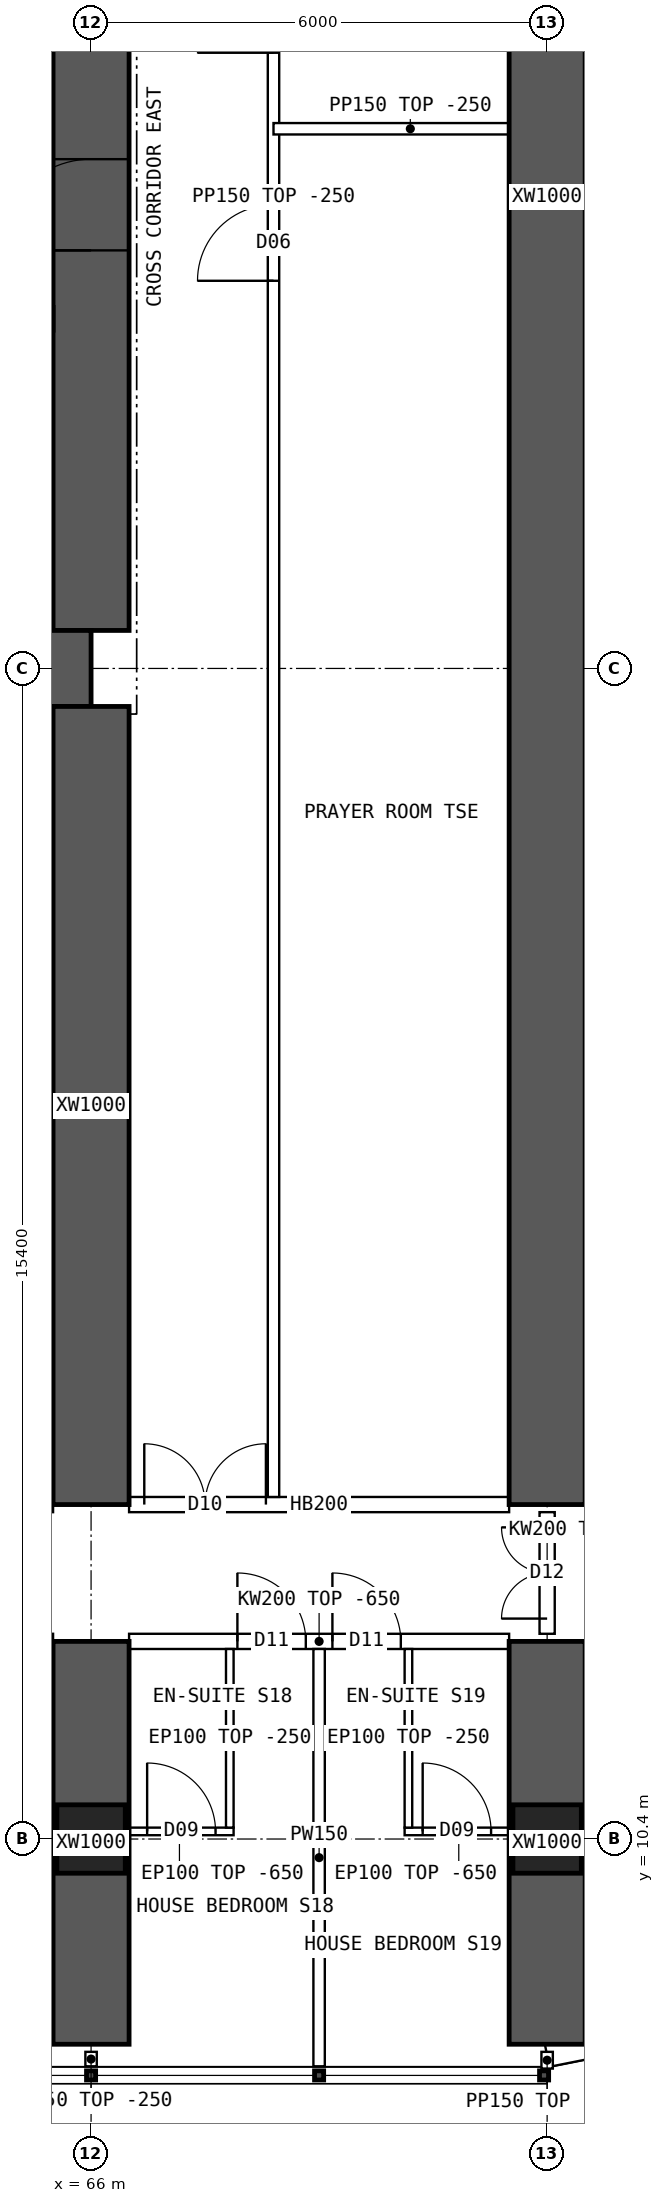
"""IFC4 building model, lengths in metres.
Left out: names, types, materials, properties, quantities, classifications, styles, units other than length and angle.
Written with IfcOpenShell. Run it as: python <this file> out.ifc"""

import sys

from ifc_helpers import new_model, si_unit, direction, frame, frame_2d, origin, origin_2d, place, context, subcontext, project, spatial, polyline, rectangle, hollow_rectangle, outline, extrude, element, fill, save


model = new_model("IFC4")
c1 = context("Model", 3, precision=1e-05, world=origin(), true_north=direction((0.0, 1.0)))
c2 = subcontext(c1, "Body", "Model", "MODEL_VIEW")
j1 = project(units=[si_unit("LENGTHUNIT", "METRE"), si_unit("PLANEANGLEUNIT", "RADIAN")], contexts=[c1])
p1 = place(None, origin())
s1 = spatial("IfcSite", under=j1, at=p1, CompositionType="ELEMENT")
p2 = place(p1, origin())
s2 = spatial("IfcBuilding", under=s1, at=p2, CompositionType="ELEMENT")
p3 = place(p2, frame((0.0, 0.0, 27.7)))
s3 = spatial("IfcBuildingStorey", under=s2, at=p3, CompositionType="ELEMENT", Elevation=27.7)
for number, where, z_axis, x_axis in (
    (1, (66.0, 10.4, 0.0), (0.0, 0.0, 1.0), (1.0, 0.0, 0.0)),
    (2, (72.0, 10.4, 0.0), (0.0, 0.0, 1.0), (1.0, 0.0, 0.0)),
):
    element("IfcColumn", number, at=place(p3, frame(where, z_axis=z_axis, x_axis=x_axis)), inside=s3, PredefinedType="COLUMN", context=c2, shape_type="SweptSolid", body=[
        extrude(hollow_rectangle(XDim=0.9, YDim=0.9, WallThickness=0.09, at=origin_2d()), origin(), (0.0, 0.0, 1.0), 3.75),
    ])
p4 = place(p3, frame((18.0, 25.8, 0.0), z_axis=(0.0, 0.0, 1.0), x_axis=(1.0, 0.0, 0.0)))
e3 = element("IfcWall", 3, at=p4, inside=s3, PredefinedType="SHEAR", context=c2, shape_type="SweptSolid", body=[
    extrude(rectangle(XDim=48.0, YDim=1.0, at=frame_2d((24.0, 0.0))), origin(), (0.0, 0.0, 1.0), 3.75),
])
p5 = place(p3, frame((66.0, 26.3, 0.0), z_axis=(0.0, 0.0, 1.0), x_axis=(0.0, 1.0, 0.0)))
e4 = element("IfcWall", 4, at=p5, inside=s3, PredefinedType="SHEAR", context=c2, shape_type="SweptSolid", body=[
    extrude(rectangle(XDim=11.4, YDim=1.0, at=frame_2d((5.7, 0.0))), origin(), (0.0, 0.0, 1.0), 3.75),
])
p6 = place(p5, frame((5.0, 0.0, 0.0)))
e5 = element("IfcOpeningElement", 5, at=p6, cuts=e4, PredefinedType="OPENING", context=c2, shape_type="SweptSolid", body=[
    extrude(rectangle(XDim=1.2, YDim=2.1, at=frame_2d((0.6, 1.05))), frame((0.0, 0.51, 0.0), z_axis=(0.0, -1.0, 0.0), x_axis=(1.0, 0.0, 0.0)), (0.0, 0.0, 1.0), 1.02),
])
p7 = place(p3, frame((66.0, 7.7, 0.0), z_axis=(0.0, 0.0, 1.0), x_axis=(0.0, 1.0, 0.0)))
e6 = element("IfcWall", 6, at=p7, inside=s3, PredefinedType="SHEAR", context=c2, shape_type="SweptSolid", body=[
    extrude(rectangle(XDim=5.3, YDim=1.0, at=frame_2d((2.65, 0.0))), origin(), (0.0, 0.0, 1.0), 3.75),
])
p8 = place(p3, frame((66.0, 14.8, 0.0), z_axis=(0.0, 0.0, 1.0), x_axis=(0.0, 1.0, 0.0)))
e7 = element("IfcWall", 7, at=p8, inside=s3, PredefinedType="SHEAR", context=c2, shape_type="SweptSolid", body=[
    extrude(rectangle(XDim=10.5, YDim=1.0, at=frame_2d((5.25, 0.0))), origin(), (0.0, 0.0, 1.0), 3.75),
])
p9 = place(p3, frame((72.0, 7.7, 0.0), z_axis=(0.0, 0.0, 1.0), x_axis=(0.0, 1.0, 0.0)))
e8 = element("IfcWall", 8, at=p9, inside=s3, PredefinedType="SHEAR", context=c2, shape_type="SweptSolid", body=[
    extrude(rectangle(XDim=5.3, YDim=1.0, at=frame_2d((2.65, 0.0))), origin(), (0.0, 0.0, 1.0), 3.75),
])
p10 = place(p3, frame((72.0, 14.8, 0.0), z_axis=(0.0, 0.0, 1.0), x_axis=(0.0, 1.0, 0.0)))
e9 = element("IfcWall", 9, at=p10, inside=s3, PredefinedType="SHEAR", context=c2, shape_type="SweptSolid", body=[
    extrude(rectangle(XDim=34.4, YDim=1.0, at=frame_2d((17.2, 0.0))), origin(), (0.0, 0.0, 1.0), 3.75),
])
p11 = place(p3, frame((72.0, 7.55, 0.0), z_axis=(0.0, 0.0, 1.0), x_axis=(0.980787251524, 0.195080412259, 0.0)))
e10 = element("IfcWall", 10, at=p11, inside=s3, PredefinedType="SOLIDWALL", context=c2, shape_type="SweptSolid", body=[
    extrude(outline(polyline([(-0.03, -0.15), (3.249, -0.15), (3.189, 0.15), (0.03, 0.15), (-0.03, -0.15)])), origin(), (0.0, 0.0, 1.0), 3.5),
])
p12 = place(p11, frame((0.909, 0.0, 0.9)))
e11 = element("IfcOpeningElement", 11, at=p12, cuts=e10, PredefinedType="OPENING", context=c2, shape_type="SweptSolid", body=[
    extrude(rectangle(XDim=1.4, YDim=1.8, at=frame_2d((0.7, 0.9))), frame((0.0, 0.16, 0.0), z_axis=(0.0, -1.0, 0.0), x_axis=(1.0, 0.0, 0.0)), (0.0, 0.0, 1.0), 0.32),
])
p13 = place(p3, frame((66.5, 13.0, 0.0), z_axis=(0.0, 0.0, 1.0), x_axis=(1.0, 0.0, 0.0)))
e12 = element("IfcWall", 12, at=p13, inside=s3, PredefinedType="SOLIDWALL", context=c2, shape_type="SweptSolid", body=[
    extrude(outline(polyline([(0.0, 0.0), (5.0, 0.0), (5.0, 3.1), (0.0, 3.1), (0.0, 0.0)])), frame((0.0, 0.1, 0.0), z_axis=(0.0, -1.0, 0.0), x_axis=(1.0, 0.0, 0.0)), (0.0, 0.0, 1.0), 0.2),
])
p14 = place(p13, frame((1.425, 0.0, 0.0)))
e13 = element("IfcOpeningElement", 13, at=p14, cuts=e12, PredefinedType="OPENING", context=c2, shape_type="SweptSolid", body=[
    extrude(rectangle(XDim=0.9, YDim=2.1, at=frame_2d((0.45, 1.05))), frame((0.0, 0.11, 0.0), z_axis=(0.0, -1.0, 0.0), x_axis=(1.0, 0.0, 0.0)), (0.0, 0.0, 1.0), 0.22),
])
p15 = place(p13, frame((2.675, 0.0, 0.0)))
e14 = element("IfcOpeningElement", 14, at=p15, cuts=e12, PredefinedType="OPENING", context=c2, shape_type="SweptSolid", body=[
    extrude(rectangle(XDim=0.9, YDim=2.1, at=frame_2d((0.45, 1.05))), frame((0.0, 0.11, 0.0), z_axis=(0.0, -1.0, 0.0), x_axis=(1.0, 0.0, 0.0)), (0.0, 0.0, 1.0), 0.22),
])
p16 = place(p3, frame((66.5, 14.8, 0.0), z_axis=(0.0, 0.0, 1.0), x_axis=(1.0, 0.0, 0.0)))
e15 = element("IfcWall", 15, at=p16, inside=s3, PredefinedType="SOLIDWALL", context=c2, shape_type="SweptSolid", body=[
    extrude(rectangle(XDim=5.0, YDim=0.2, at=frame_2d((2.5, 0.0))), origin(), (0.0, 0.0, 1.0), 3.5),
])
p17 = place(p16, frame((0.2, 0.0, 0.0)))
e16 = element("IfcOpeningElement", 16, at=p17, cuts=e15, PredefinedType="OPENING", context=c2, shape_type="SweptSolid", body=[
    extrude(rectangle(XDim=1.6, YDim=2.1, at=frame_2d((0.8, 1.05))), frame((0.0, 0.11, 0.0), z_axis=(0.0, -1.0, 0.0), x_axis=(1.0, 0.0, 0.0)), (0.0, 0.0, 1.0), 0.22),
])
p18 = place(p3, frame((65.55, 10.5, 0.0), z_axis=(0.0, 0.0, 1.0), x_axis=(-1.0, 0.0, 0.0)))
e17 = element("IfcWall", 17, at=p18, inside=s3, PredefinedType="PARTITIONING", context=c2, shape_type="SweptSolid", body=[
    extrude(outline(polyline([(0.0, 0.0), (1.425, 0.0), (1.425, 3.1), (0.0, 3.1), (0.0, 0.0)])), frame((0.0, 0.05, 0.0), z_axis=(0.0, -1.0, 0.0), x_axis=(1.0, 0.0, 0.0)), (0.0, 0.0, 1.0), 0.1),
])
p19 = place(p18, frame((0.288, 0.0, 0.0)))
e18 = element("IfcOpeningElement", 18, at=p19, cuts=e17, PredefinedType="OPENING", context=c2, shape_type="SweptSolid", body=[
    extrude(rectangle(XDim=0.9, YDim=2.1, at=frame_2d((0.45, 1.05))), frame((0.0, 0.06, 0.0), z_axis=(0.0, -1.0, 0.0), x_axis=(1.0, 0.0, 0.0)), (0.0, 0.0, 1.0), 0.12),
])
p20 = place(p3, frame((69.0, 7.41, 0.0), z_axis=(0.0, 0.0, 1.0), x_axis=(0.0, 1.0, 0.0)))
e19 = element("IfcWall", 19, at=p20, inside=s3, PredefinedType="PARTITIONING", context=c2, shape_type="SweptSolid", body=[
    extrude(outline(polyline([(0.0, 0.0), (5.49, 0.0), (5.49, 3.1), (5.442, 3.1), (5.44, 3.5), (3.192, 3.5), (3.19, 3.1), (2.792, 3.1), (2.79, 3.5), (0.0, 3.5), (0.0, 0.0)])), frame((0.0, 0.075, 0.0), z_axis=(0.0, -1.0, 0.0), x_axis=(1.0, 0.0, 0.0)), (0.0, 0.0, 1.0), 0.15),
])
p21 = place(p3, frame((67.875, 10.5, 0.0), z_axis=(0.0, 0.0, 1.0), x_axis=(-1.0, 0.0, 0.0)))
e20 = element("IfcWall", 20, at=p21, inside=s3, PredefinedType="PARTITIONING", context=c2, shape_type="SweptSolid", body=[
    extrude(outline(polyline([(0.0, 0.0), (1.425, 0.0), (1.425, 3.1), (0.0, 3.1), (0.0, 0.0)])), frame((0.0, 0.05, 0.0), z_axis=(0.0, -1.0, 0.0), x_axis=(1.0, 0.0, 0.0)), (0.0, 0.0, 1.0), 0.1),
])
p22 = place(p21, frame((0.238, 0.0, 0.0)))
e21 = element("IfcOpeningElement", 21, at=p22, cuts=e20, PredefinedType="OPENING", context=c2, shape_type="SweptSolid", body=[
    extrude(rectangle(XDim=0.9, YDim=2.1, at=frame_2d((0.45, 1.05))), frame((0.0, 0.06, 0.0), z_axis=(0.0, -1.0, 0.0), x_axis=(1.0, 0.0, 0.0)), (0.0, 0.0, 1.0), 0.12),
])
p23 = place(p3, frame((67.825, 10.55, 0.0), z_axis=(0.0, 0.0, 1.0), x_axis=(0.0, 1.0, 0.0)))
e22 = element("IfcWall", 22, at=p23, inside=s3, PredefinedType="PARTITIONING", context=c2, shape_type="SweptSolid", body=[
    extrude(outline(polyline([(0.0, 0.0), (2.35, 0.0), (2.35, 3.1), (2.302, 3.1), (2.3, 3.5), (0.052, 3.5), (0.05, 3.1), (0.0, 3.1), (0.0, 0.0)])), frame((0.0, 0.05, 0.0), z_axis=(0.0, -1.0, 0.0), x_axis=(1.0, 0.0, 0.0)), (0.0, 0.0, 1.0), 0.1),
])
p24 = place(p3, frame((71.55, 10.5, 0.0), z_axis=(0.0, 0.0, 1.0), x_axis=(-1.0, 0.0, 0.0)))
e23 = element("IfcWall", 23, at=p24, inside=s3, PredefinedType="PARTITIONING", context=c2, shape_type="SweptSolid", body=[
    extrude(outline(polyline([(0.0, 0.0), (1.425, 0.0), (1.425, 3.1), (0.0, 3.1), (0.0, 0.0)])), frame((0.0, 0.05, 0.0), z_axis=(0.0, -1.0, 0.0), x_axis=(1.0, 0.0, 0.0)), (0.0, 0.0, 1.0), 0.1),
])
p25 = place(p24, frame((0.288, 0.0, 0.0)))
e24 = element("IfcOpeningElement", 24, at=p25, cuts=e23, PredefinedType="OPENING", context=c2, shape_type="SweptSolid", body=[
    extrude(rectangle(XDim=0.9, YDim=2.1, at=frame_2d((0.45, 1.05))), frame((0.0, 0.06, 0.0), z_axis=(0.0, -1.0, 0.0), x_axis=(1.0, 0.0, 0.0)), (0.0, 0.0, 1.0), 0.12),
])
p26 = place(p3, frame((70.175, 10.55, 0.0), z_axis=(0.0, 0.0, 1.0), x_axis=(0.0, 1.0, 0.0)))
e25 = element("IfcWall", 25, at=p26, inside=s3, PredefinedType="PARTITIONING", context=c2, shape_type="SweptSolid", body=[
    extrude(outline(polyline([(0.0, 0.0), (2.35, 0.0), (2.35, 3.1), (2.302, 3.1), (2.3, 3.5), (0.052, 3.5), (0.05, 3.1), (0.0, 3.1), (0.0, 0.0)])), frame((0.0, 0.05, 0.0), z_axis=(0.0, -1.0, 0.0), x_axis=(1.0, 0.0, 0.0)), (0.0, 0.0, 1.0), 0.1),
])
p27 = place(p3, frame((68.4, 14.9, 0.0), z_axis=(0.0, 0.0, 1.0), x_axis=(0.0, 1.0, 0.0)))
e26 = element("IfcWall", 26, at=p27, inside=s3, PredefinedType="PARTITIONING", context=c2, shape_type="SweptSolid", body=[
    extrude(rectangle(XDim=34.2, YDim=0.15, at=frame_2d((17.1, 0.0))), origin(), (0.0, 0.0, 1.0), 3.5),
])
p28 = place(p27, frame((16.0, 0.0, 0.0)))
e27 = element("IfcOpeningElement", 27, at=p28, cuts=e26, PredefinedType="OPENING", context=c2, shape_type="SweptSolid", body=[
    extrude(rectangle(XDim=1.0, YDim=2.1, at=frame_2d((0.5, 1.05))), frame((0.0, 0.085, 0.0), z_axis=(0.0, -1.0, 0.0), x_axis=(1.0, 0.0, 0.0)), (0.0, 0.0, 1.0), 0.17),
])
p29 = place(p27, frame((19.0, 0.0, 0.0)))
e28 = element("IfcOpeningElement", 28, at=p29, cuts=e26, PredefinedType="OPENING", context=c2, shape_type="SweptSolid", body=[
    extrude(rectangle(XDim=1.0, YDim=2.1, at=frame_2d((0.5, 1.05))), frame((0.0, 0.085, 0.0), z_axis=(0.0, -1.0, 0.0), x_axis=(1.0, 0.0, 0.0)), (0.0, 0.0, 1.0), 0.17),
])
p30 = place(p3, frame((68.4, 32.9, 0.0), z_axis=(0.0, 0.0, 1.0), x_axis=(1.0, 0.0, 0.0)))
e29 = element("IfcWall", 29, at=p30, inside=s3, PredefinedType="PARTITIONING", context=c2, shape_type="SweptSolid", body=[
    extrude(rectangle(XDim=3.6, YDim=0.15, at=frame_2d((1.8, 0.0))), origin(), (0.0, 0.0, 1.0), 3.5),
])
p31 = place(p3, frame((72.075, 30.85, 0.0), z_axis=(0.0, 0.0, 1.0), x_axis=(1.0, 0.0, 0.0)))
e30 = element("IfcWall", 30, at=p31, inside=s3, PredefinedType="PARTITIONING", context=c2, shape_type="SweptSolid", body=[
    extrude(outline(polyline([(0.0, 0.0), (8.02, 0.0), (8.02, 3.5), (6.227, 3.5), (6.225, 3.05), (5.627, 3.05), (5.625, 3.5), (0.0, 3.5), (0.0, 0.0)])), frame((0.0, 0.075, 0.0), z_axis=(0.0, -1.0, 0.0), x_axis=(1.0, 0.0, 0.0)), (0.0, 0.0, 1.0), 0.15),
])
p32 = place(p3, frame((72.0, 13.1, 0.0), z_axis=(0.0, 0.0, 1.0), x_axis=(0.0, 1.0, 0.0)))
e31 = element("IfcWall", 31, at=p32, inside=s3, PredefinedType="SOLIDWALL", context=c2, shape_type="SweptSolid", body=[
    extrude(outline(polyline([(0.0, 0.0), (1.6, 0.0), (1.6, 3.05), (0.0, 3.05), (0.0, 0.0)])), frame((0.0, 0.1, 0.0), z_axis=(0.0, -1.0, 0.0), x_axis=(1.0, 0.0, 0.0)), (0.0, 0.0, 1.0), 0.2),
])
p33 = place(p32, frame((0.2, 0.0, 0.0)))
e32 = element("IfcOpeningElement", 32, at=p33, cuts=e31, PredefinedType="OPENING", context=c2, shape_type="SweptSolid", body=[
    extrude(rectangle(XDim=1.2, YDim=2.1, at=frame_2d((0.6, 1.05))), frame((0.0, 0.11, 0.0), z_axis=(0.0, -1.0, 0.0), x_axis=(1.0, 0.0, 0.0)), (0.0, 0.0, 1.0), 0.22),
])
p34 = place(p3, frame((66.0, 7.6, 0.0), z_axis=(0.0, 0.0, 1.0), x_axis=(0.0, -1.0, 0.0)))
e33 = element("IfcWall", 33, at=p34, inside=s3, PredefinedType="PARTITIONING", context=c2, shape_type="SweptSolid", body=[
    extrude(rectangle(XDim=0.19, YDim=0.15, at=frame_2d((0.095, 0.0))), origin(), (0.0, 0.0, 1.0), 3.5),
])
p35 = place(p3, frame((72.0, 7.6, 0.0), z_axis=(0.0, 0.0, 1.0), x_axis=(0.0, -1.0, 0.0)))
e34 = element("IfcWall", 34, at=p35, inside=s3, PredefinedType="PARTITIONING", context=c2, shape_type="SweptSolid", body=[
    extrude(rectangle(XDim=0.22, YDim=0.15, at=frame_2d((0.11, 0.0))), origin(), (0.0, 0.0, 1.0), 3.5),
])
p36 = place(p6, origin())
e35 = element("IfcDoor", 35, at=p36, inside=s3, OperationType="SINGLE_SWING_LEFT", PredefinedType="DOOR", context=c2, shape_type="SweptSolid", body=[
    extrude(rectangle(XDim=1.2, YDim=2.1, at=frame_2d((0.6, 1.05))), frame((0.0, 0.025, 0.0), z_axis=(0.0, -1.0, 0.0), x_axis=(1.0, 0.0, 0.0)), (0.0, 0.0, 1.0), 0.05),
])
fill(e5, e35)
p37 = place(p17, origin())
e36 = element("IfcDoor", 36, at=p37, inside=s3, OperationType="DOUBLE_DOOR_SINGLE_SWING", PredefinedType="DOOR", context=c2, shape_type="SweptSolid", body=[
    extrude(rectangle(XDim=1.6, YDim=2.1, at=frame_2d((0.8, 1.05))), frame((0.0, 0.025, 0.0), z_axis=(0.0, -1.0, 0.0), x_axis=(1.0, 0.0, 0.0)), (0.0, 0.0, 1.0), 0.05),
])
fill(e16, e36)
p38 = place(p22, origin())
e37 = element("IfcDoor", 37, at=p38, inside=s3, OperationType="SINGLE_SWING_RIGHT", PredefinedType="DOOR", context=c2, shape_type="SweptSolid", body=[
    extrude(rectangle(XDim=0.9, YDim=2.1, at=frame_2d((0.45, 1.05))), frame((0.0, 0.025, 0.0), z_axis=(0.0, -1.0, 0.0), x_axis=(1.0, 0.0, 0.0)), (0.0, 0.0, 1.0), 0.05),
])
fill(e21, e37)
p39 = place(p14, origin())
e38 = element("IfcDoor", 38, at=p39, inside=s3, OperationType="SINGLE_SWING_LEFT", PredefinedType="DOOR", context=c2, shape_type="SweptSolid", body=[
    extrude(rectangle(XDim=0.9, YDim=2.1, at=frame_2d((0.45, 1.05))), frame((0.0, 0.025, 0.0), z_axis=(0.0, -1.0, 0.0), x_axis=(1.0, 0.0, 0.0)), (0.0, 0.0, 1.0), 0.05),
])
fill(e13, e38)
p40 = place(p25, origin())
e39 = element("IfcDoor", 39, at=p40, inside=s3, OperationType="SINGLE_SWING_RIGHT", PredefinedType="DOOR", context=c2, shape_type="SweptSolid", body=[
    extrude(rectangle(XDim=0.9, YDim=2.1, at=frame_2d((0.45, 1.05))), frame((0.0, 0.025, 0.0), z_axis=(0.0, -1.0, 0.0), x_axis=(1.0, 0.0, 0.0)), (0.0, 0.0, 1.0), 0.05),
])
fill(e24, e39)
p41 = place(p15, origin())
e40 = element("IfcDoor", 40, at=p41, inside=s3, OperationType="SINGLE_SWING_LEFT", PredefinedType="DOOR", context=c2, shape_type="SweptSolid", body=[
    extrude(rectangle(XDim=0.9, YDim=2.1, at=frame_2d((0.45, 1.05))), frame((0.0, 0.025, 0.0), z_axis=(0.0, -1.0, 0.0), x_axis=(1.0, 0.0, 0.0)), (0.0, 0.0, 1.0), 0.05),
])
fill(e14, e40)
p42 = place(p28, origin())
e41 = element("IfcDoor", 41, at=p42, inside=s3, OperationType="SINGLE_SWING_LEFT", PredefinedType="DOOR", context=c2, shape_type="SweptSolid", body=[
    extrude(rectangle(XDim=1.0, YDim=2.1, at=frame_2d((0.5, 1.05))), frame((0.0, 0.025, 0.0), z_axis=(0.0, -1.0, 0.0), x_axis=(1.0, 0.0, 0.0)), (0.0, 0.0, 1.0), 0.05),
])
fill(e27, e41)
p43 = place(p33, origin())
e42 = element("IfcDoor", 42, at=p43, inside=s3, OperationType="DOUBLE_DOOR_SINGLE_SWING", PredefinedType="DOOR", context=c2, shape_type="SweptSolid", body=[
    extrude(rectangle(XDim=1.2, YDim=2.1, at=frame_2d((0.6, 1.05))), frame((0.0, 0.025, 0.0), z_axis=(0.0, -1.0, 0.0), x_axis=(1.0, 0.0, 0.0)), (0.0, 0.0, 1.0), 0.05),
])
fill(e32, e42)
save(model, sys.argv[1])
